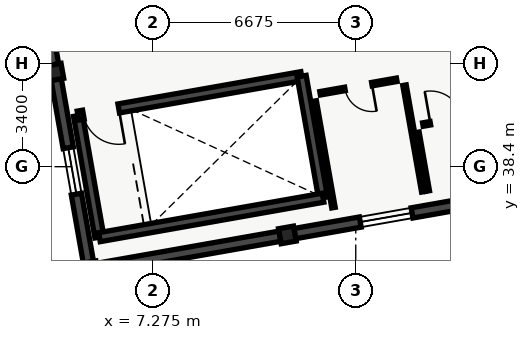
"""IFC4 building model, lengths in metres.
Left out: names, types, materials, properties, quantities, classifications, styles, units other than length and angle.
Written with IfcOpenShell. Run it as: python <this file> out.ifc"""

import sys

from ifc_helpers import new_model, si_unit, direction, frame, frame_2d, origin, origin_2d, place, context, subcontext, project, spatial, polyline, rectangle, outline, extrude, element, fill, save


model = new_model("IFC4")
c1 = context("Model", 3, precision=1e-05, world=origin(), true_north=direction((0.0, 1.0)))
c2 = subcontext(c1, "Body", "Model", "MODEL_VIEW")
j1 = project(units=[si_unit("LENGTHUNIT", "METRE"), si_unit("PLANEANGLEUNIT", "RADIAN")], contexts=[c1])
p1 = place(None, origin())
s1 = spatial("IfcSite", under=j1, at=p1, CompositionType="ELEMENT")
p2 = place(p1, origin())
s2 = spatial("IfcBuilding", under=s1, at=p2, CompositionType="ELEMENT")
p3 = place(p2, frame((0.0, 0.0, 49.2)))
s3 = spatial("IfcBuildingStorey", under=s2, at=p3, CompositionType="ELEMENT", Elevation=49.2)
p4 = place(p3, frame((4.054, 41.51, 0.0), z_axis=(0.0, 0.0, 1.0), x_axis=(0.984807753012, 0.173648177667, 0.0)))
e1 = element("IfcColumn", 1, at=p4, inside=s3, PredefinedType="COLUMN", context=c2, shape_type="SweptSolid", body=[
    extrude(rectangle(XDim=0.5, YDim=0.5, at=origin_2d()), origin(), (0.0, 0.0, 1.0), 4.2),
])
p5 = place(p3, frame((11.7, 36.156, 0.0), z_axis=(0.0, 0.0, 1.0), x_axis=(0.984807753012, 0.173648177667, 0.0)))
e2 = element("IfcColumn", 2, at=p5, inside=s3, PredefinedType="COLUMN", context=c2, shape_type="SweptSolid", body=[
    extrude(rectangle(XDim=0.5, YDim=0.5, at=origin_2d()), origin(), (0.0, 0.0, 1.0), 3.985),
])
p6 = place(p3, frame((5.157, 35.251, 0.0), z_axis=(0.0, 0.0, 1.0), x_axis=(-0.173650847905, 0.984807282173, 0.0)))
e3 = element("IfcWall", 3, at=p6, inside=s3, PredefinedType="SOLIDWALL", context=c2, shape_type="SweptSolid", body=[
    extrude(outline(polyline([(0.0, 0.0), (6.11, 0.0), (6.11, 5.234), (0.0, 4.0), (0.0, 0.0)])), frame((0.0, 0.17, 0.0), z_axis=(0.0, -1.0, 0.0), x_axis=(1.0, 0.0, 0.0)), (0.0, 0.0, 1.0), 0.34),
])
p7 = place(p6, frame((2.28, 0.0, 0.95)))
e4 = element("IfcOpeningElement", 4, at=p7, cuts=e3, PredefinedType="OPENING", context=c2, shape_type="SweptSolid", body=[
    extrude(rectangle(XDim=1.55, YDim=1.46, at=frame_2d((0.775, 0.73))), frame((0.0, 0.17, 0.0), z_axis=(0.0, -1.0, 0.0), x_axis=(1.0, 0.0, 0.0)), (0.0, 0.0, 1.0), 0.34),
])
p8 = place(p3, frame((4.011, 41.751, 0.0), z_axis=(0.0, 0.0, 1.0), x_axis=(-0.173657681232, 0.98480607723, 0.0)))
e5 = element("IfcWall", 5, at=p8, inside=s3, PredefinedType="SOLIDWALL", context=c2, shape_type="SweptSolid", body=[
    extrude(outline(polyline([(0.0, 0.0), (6.11, 0.0), (6.11, 6.567), (0.0, 5.333), (0.0, 0.0)])), frame((0.0, 0.17, 0.0), z_axis=(0.0, -1.0, 0.0), x_axis=(1.0, 0.0, 0.0)), (0.0, 0.0, 1.0), 0.34),
])
p9 = place(p8, frame((2.235, 0.0, 0.95)))
e6 = element("IfcOpeningElement", 6, at=p9, cuts=e5, PredefinedType="OPENING", context=c2, shape_type="SweptSolid", body=[
    extrude(rectangle(XDim=1.64, YDim=1.48, at=frame_2d((0.82, 0.74))), frame((0.0, 0.17, 0.0), z_axis=(0.0, -1.0, 0.0), x_axis=(1.0, 0.0, 0.0)), (0.0, 0.0, 1.0), 0.34),
])
p10 = place(p3, frame((17.958, 37.26, 0.0), z_axis=(0.0, 0.0, 1.0), x_axis=(-0.98481411452, -0.173612095898, 0.0)))
e7 = element("IfcWall", 7, at=p10, inside=s3, PredefinedType="SOLIDWALL", context=c2, shape_type="SweptSolid", body=[
    extrude(rectangle(XDim=6.11, YDim=0.34, at=frame_2d((3.055, 0.0))), origin(), (0.0, 0.0, 1.0), 3.47),
])
p11 = place(p10, frame((2.19, 0.0, 0.95)))
e8 = element("IfcOpeningElement", 8, at=p11, cuts=e7, PredefinedType="OPENING", context=c2, shape_type="SweptSolid", body=[
    extrude(rectangle(XDim=1.73, YDim=1.36, at=frame_2d((0.865, 0.68))), frame((0.0, 0.17, 0.0), z_axis=(0.0, -1.0, 0.0), x_axis=(1.0, 0.0, 0.0)), (0.0, 0.0, 1.0), 0.34),
])
p12 = place(p3, frame((11.458, 36.114, 0.0), z_axis=(0.0, 0.0, 1.0), x_axis=(-0.984807282173, -0.173650847905, 0.0)))
e9 = element("IfcWall", 9, at=p12, inside=s3, PredefinedType="SOLIDWALL", context=c2, shape_type="SweptSolid", body=[
    extrude(rectangle(XDim=6.11, YDim=0.34, at=frame_2d((3.055, 0.0))), origin(), (0.0, 0.0, 1.0), 3.47),
])
p13 = place(p3, frame((5.519, 36.082, 0.0), z_axis=(0.0, 0.0, 1.0), x_axis=(-0.173665267602, 0.984804739443, 0.0)))
e10 = element("IfcWall", 10, at=p13, inside=s3, PredefinedType="SHEAR", context=c2, shape_type="SweptSolid", body=[
    extrude(rectangle(XDim=4.06, YDim=0.3, at=frame_2d((2.03, 0.0))), origin(), (0.0, 0.0, 1.0), 3.98),
])
p14 = place(p3, frame((4.814, 40.08, 0.0), z_axis=(0.0, 0.0, 1.0), x_axis=(0.984802636214, 0.173677193974, 0.0)))
e11 = element("IfcWall", 11, at=p14, inside=s3, PredefinedType="SHEAR", context=c2, shape_type="SweptSolid", body=[
    extrude(rectangle(XDim=7.47, YDim=0.3, at=frame_2d((3.735, 0.0))), origin(), (0.0, 0.0, 1.0), 3.98),
])
p15 = place(p14, frame((0.18, 0.0, 0.0)))
e12 = element("IfcOpeningElement", 12, at=p15, cuts=e11, PredefinedType="OPENING", context=c2, shape_type="SweptSolid", body=[
    extrude(rectangle(XDim=1.18, YDim=2.15, at=frame_2d((0.59, 1.075))), frame((0.0, 0.15, 0.0), z_axis=(0.0, -1.0, 0.0), x_axis=(1.0, 0.0, 0.0)), (0.0, 0.0, 1.0), 0.3),
])
p16 = place(p3, frame((12.17, 41.377, 0.0), z_axis=(0.0, 0.0, 1.0), x_axis=(0.173654983803, -0.984806552883, 0.0)))
e13 = element("IfcWall", 13, at=p16, inside=s3, PredefinedType="SHEAR", context=c2, shape_type="SweptSolid", body=[
    extrude(rectangle(XDim=4.06, YDim=0.3, at=frame_2d((2.03, 0.0))), origin(), (0.0, 0.0, 1.0), 3.98),
])
p17 = place(p3, frame((12.875, 37.379, 0.0), z_axis=(0.0, 0.0, 1.0), x_axis=(-0.984808225754, -0.173645496596, 0.0)))
e14 = element("IfcWall", 14, at=p17, inside=s3, PredefinedType="SHEAR", context=c2, shape_type="SweptSolid", body=[
    extrude(rectangle(XDim=7.47, YDim=0.3, at=frame_2d((3.735, 0.0))), origin(), (0.0, 0.0, 1.0), 3.98),
])
p18 = place(p3, frame((16.171, 37.574, 0.0), z_axis=(0.0, 0.0, 1.0), x_axis=(-0.173644490041, 0.984808403233, 0.0)))
e15 = element("IfcWall", 15, at=p18, inside=s3, PredefinedType="PARTITIONING", context=c2, shape_type="SweptSolid", body=[
    extrude(rectangle(XDim=3.56, YDim=0.115, at=frame_2d((1.78, 0.0))), origin(), (0.0, 0.0, 1.0), 3.65),
])
p19 = place(p3, frame((15.298, 41.259, 0.0), z_axis=(0.0, 0.0, 1.0), x_axis=(-0.984803714572, -0.17367107924, 0.0)))
e16 = element("IfcWall", 16, at=p19, inside=s3, PredefinedType="PARTITIONING", context=c2, shape_type="SweptSolid", body=[
    extrude(rectangle(XDim=2.56, YDim=0.115, at=frame_2d((1.28, 0.0))), origin(), (0.0, 0.0, 1.0), 3.65),
])
p20 = place(p19, frame((0.83, 0.0, 0.0)))
e17 = element("IfcOpeningElement", 17, at=p20, cuts=e16, PredefinedType="OPENING", context=c2, shape_type="SweptSolid", body=[
    extrude(rectangle(XDim=0.9, YDim=2.1, at=frame_2d((0.45, 1.05))), frame((0.0, 0.058, 0.0), z_axis=(0.0, -1.0, 0.0), x_axis=(1.0, 0.0, 0.0)), (0.0, 0.0, 1.0), 0.115),
])
p21 = place(p3, frame((12.599, 40.559, 0.0), z_axis=(0.0, 0.0, 1.0), x_axis=(0.173644490041, -0.984808403233, 0.0)))
e18 = element("IfcWall", 18, at=p21, inside=s3, PredefinedType="PARTITIONING", context=c2, shape_type="SweptSolid", body=[
    extrude(rectangle(XDim=3.56, YDim=0.115, at=frame_2d((1.78, 0.0))), origin(), (0.0, 0.0, 1.0), 3.65),
])
p22 = place(p3, frame((17.694, 40.056, 0.0), z_axis=(0.0, 0.0, 1.0), x_axis=(-0.984797734253, -0.173704987291, 0.0)))
e19 = element("IfcWall", 19, at=p22, inside=s3, PredefinedType="PARTITIONING", context=c2, shape_type="SweptSolid", body=[
    extrude(rectangle(XDim=1.56, YDim=0.115, at=frame_2d((0.78, 0.0))), origin(), (0.0, 0.0, 1.0), 3.65),
])
p23 = place(p22, frame((0.25, 0.0, 0.0)))
e20 = element("IfcOpeningElement", 20, at=p23, cuts=e19, PredefinedType="OPENING", context=c2, shape_type="SweptSolid", body=[
    extrude(rectangle(XDim=1.06, YDim=2.12, at=frame_2d((0.53, 1.06))), frame((0.0, 0.058, 0.0), z_axis=(0.0, -1.0, 0.0), x_axis=(1.0, 0.0, 0.0)), (0.0, 0.0, 1.0), 0.115),
])
p24 = place(p3, frame((15.979, 39.53, 0.0), z_axis=(0.0, 0.0, 1.0), x_axis=(0.173643211285, -0.984808628706, 0.0)))
e21 = element("IfcWall", 21, at=p24, inside=s3, PredefinedType="PARTITIONING", context=c2, shape_type="SweptSolid", body=[
    extrude(rectangle(XDim=1.96, YDim=0.115, at=frame_2d((0.98, 0.0))), origin(), (0.0, 0.0, 1.0), 3.65),
])
p25 = place(p7, origin())
e22 = element("IfcWindow", 22, at=p25, inside=s3, PartitioningType="SINGLE_PANEL", PredefinedType="WINDOW", context=c2, shape_type="SweptSolid", body=[
    extrude(rectangle(XDim=1.55, YDim=1.46, at=frame_2d((0.775, 0.73))), frame((0.0, 0.03, 0.0), z_axis=(0.0, -1.0, 0.0), x_axis=(1.0, 0.0, 0.0)), (0.0, 0.0, 1.0), 0.06),
])
fill(e4, e22)
p26 = place(p11, origin())
e23 = element("IfcWindow", 23, at=p26, inside=s3, PartitioningType="SINGLE_PANEL", PredefinedType="WINDOW", context=c2, shape_type="SweptSolid", body=[
    extrude(rectangle(XDim=1.73, YDim=1.36, at=frame_2d((0.865, 0.68))), frame((0.0, 0.03, 0.0), z_axis=(0.0, -1.0, 0.0), x_axis=(1.0, 0.0, 0.0)), (0.0, 0.0, 1.0), 0.06),
])
fill(e8, e23)
p27 = place(p15, origin())
e24 = element("IfcDoor", 24, at=p27, inside=s3, OperationType="SINGLE_SWING_RIGHT", PredefinedType="DOOR", context=c2, shape_type="SweptSolid", body=[
    extrude(rectangle(XDim=1.18, YDim=2.15, at=frame_2d((0.59, 1.075))), frame((0.0, 0.025, 0.0), z_axis=(0.0, -1.0, 0.0), x_axis=(1.0, 0.0, 0.0)), (0.0, 0.0, 1.0), 0.05),
])
fill(e12, e24)
p28 = place(p20, origin())
e25 = element("IfcDoor", 25, at=p28, inside=s3, OperationType="SINGLE_SWING_LEFT", PredefinedType="DOOR", context=c2, shape_type="SweptSolid", body=[
    extrude(rectangle(XDim=0.9, YDim=2.1, at=frame_2d((0.45, 1.05))), frame((0.0, 0.025, 0.0), z_axis=(0.0, -1.0, 0.0), x_axis=(1.0, 0.0, 0.0)), (0.0, 0.0, 1.0), 0.05),
])
fill(e17, e25)
p29 = place(p23, origin())
e26 = element("IfcDoor", 26, at=p29, inside=s3, OperationType="SINGLE_SWING_RIGHT", PredefinedType="DOOR", context=c2, shape_type="SweptSolid", body=[
    extrude(rectangle(XDim=1.06, YDim=2.12, at=frame_2d((0.53, 1.06))), frame((0.0, 0.025, 0.0), z_axis=(0.0, -1.0, 0.0), x_axis=(1.0, 0.0, 0.0)), (0.0, 0.0, 1.0), 0.05),
])
fill(e20, e26)
save(model, sys.argv[1])
